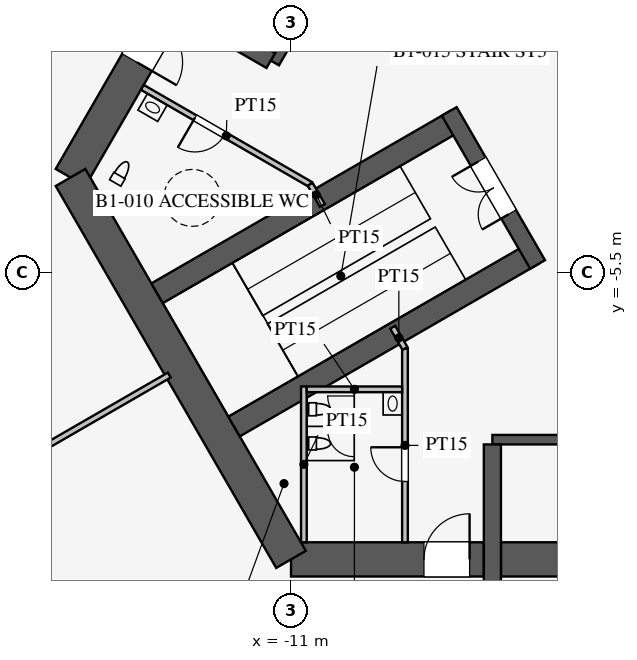
"""IFC4 building model, lengths in metres.
Left out: names, types, materials, properties, quantities, classifications, styles, units other than length and angle.
Written with IfcOpenShell. Run it as: python <this file> out.ifc"""

import sys

from ifc_helpers import new_model, si_unit, direction, frame, frame_2d, origin, place, context, subcontext, project, spatial, rectangle, extrude, element, fill, save


model = new_model("IFC4")
c1 = context("Model", 3, precision=1e-05, world=origin(), true_north=direction((0.0, 1.0)))
c2 = subcontext(c1, "Body", "Model", "MODEL_VIEW")
j1 = project(units=[si_unit("LENGTHUNIT", "METRE"), si_unit("PLANEANGLEUNIT", "RADIAN")], contexts=[c1])
p1 = place(None, origin())
s1 = spatial("IfcSite", under=j1, at=p1, CompositionType="ELEMENT")
p2 = place(p1, origin())
s2 = spatial("IfcBuilding", under=s1, at=p2, CompositionType="ELEMENT")
p3 = place(p2, frame((0.0, 0.0, -6.0)))
s3 = spatial("IfcBuildingStorey", under=s2, at=p3, CompositionType="ELEMENT", Elevation=-6.0)
p4 = place(p3, frame((-10.999, -13.05, -0.3), z_axis=(0.0, 0.0, 1.0), x_axis=(1.0, 0.0, 0.0)))
e1 = element("IfcWall", 1, at=p4, inside=s3, PredefinedType="SHEAR", context=c2, shape_type="SweptSolid", body=[
    extrude(rectangle(XDim=5.073, YDim=0.9, at=frame_2d((2.537, 0.0))), origin(), (0.0, 0.0, 1.0), 6.3),
])
p5 = place(p4, frame((3.499, 0.0, 0.3)))
e2 = element("IfcOpeningElement", 2, at=p5, cuts=e1, PredefinedType="OPENING", context=c2, shape_type="SweptSolid", body=[
    extrude(rectangle(XDim=1.2, YDim=2.1, at=frame_2d((0.6, 1.05))), frame((0.0, 0.46, 0.0), z_axis=(0.0, -1.0, 0.0), x_axis=(1.0, 0.0, 0.0)), (0.0, 0.0, 1.0), 0.92),
])
p6 = place(p3, frame((-5.475, -13.05, -0.3), z_axis=(0.0, 0.0, 1.0), x_axis=(1.0, 0.0, 0.0)))
e3 = element("IfcWall", 3, at=p6, inside=s3, PredefinedType="SHEAR", context=c2, shape_type="SweptSolid", body=[
    extrude(rectangle(XDim=2.4, YDim=0.9, at=frame_2d((1.2, 0.0))), origin(), (0.0, 0.0, 1.0), 6.3),
])
p7 = place(p3, frame((-5.802, 16.05, -0.3), z_axis=(0.0, 0.0, 1.0), x_axis=(-0.499991141822, -0.866030517996, 0.0)))
e4 = element("IfcWall", 4, at=p7, inside=s3, PredefinedType="SHEAR", context=c2, shape_type="SweptSolid", body=[
    extrude(rectangle(XDim=21.997, YDim=0.9, at=frame_2d((10.999, 0.0))), origin(), (0.0, 0.0, 1.0), 6.3),
])
p8 = place(p7, frame((17.299, 0.0, 0.3)))
e5 = element("IfcOpeningElement", 5, at=p8, cuts=e4, PredefinedType="OPENING", context=c2, shape_type="SweptSolid", body=[
    extrude(rectangle(XDim=1.2, YDim=2.1, at=frame_2d((0.6, 1.05))), frame((0.0, 0.46, 0.0), z_axis=(0.0, -1.0, 0.0), x_axis=(1.0, 0.0, 0.0)), (0.0, 0.0, 1.0), 0.92),
])
p9 = place(p7, frame((3.499, 0.0, 0.3)))
e6 = element("IfcOpeningElement", 6, at=p9, cuts=e4, PredefinedType="OPENING", context=c2, shape_type="SweptSolid", body=[
    extrude(rectangle(XDim=1.2, YDim=2.1, at=frame_2d((0.6, 1.05))), frame((0.0, 0.46, 0.0), z_axis=(0.0, -1.0, 0.0), x_axis=(1.0, 0.0, 0.0)), (0.0, 0.0, 1.0), 0.92),
])
p10 = place(p3, frame((-16.801, -3.0, -0.3), z_axis=(0.0, 0.0, 1.0), x_axis=(0.499990156827, -0.866031086669, 0.0)))
e7 = element("IfcWall", 7, at=p10, inside=s3, PredefinedType="SHEAR", context=c2, shape_type="SweptSolid", body=[
    extrude(rectangle(XDim=11.605, YDim=0.9, at=frame_2d((5.802, 0.0))), origin(), (0.0, 0.0, 1.0), 6.3),
])
p11 = place(p3, frame((-5.7, -9.9, -0.3), z_axis=(0.0, 0.0, 1.0), x_axis=(1.0, 0.0, 0.0)))
e8 = element("IfcWall", 8, at=p11, inside=s3, PredefinedType="SHEAR", context=c2, shape_type="SweptSolid", body=[
    extrude(rectangle(XDim=11.4, YDim=0.25, at=frame_2d((5.7, 0.0))), origin(), (0.0, 0.0, 1.0), 6.3),
])
p12 = place(p3, frame((-5.7, -10.025, -0.3), z_axis=(0.0, 0.0, 1.0), x_axis=(0.0, -1.0, 0.0)))
e9 = element("IfcWall", 9, at=p12, inside=s3, PredefinedType="SHEAR", context=c2, shape_type="SweptSolid", body=[
    extrude(rectangle(XDim=4.575, YDim=0.45, at=frame_2d((2.288, 0.0))), origin(), (0.0, 0.0, 1.0), 6.3),
])
p13 = place(p3, frame((-5.724, 9.886, -1.6), z_axis=(0.0, 0.0, 1.0), x_axis=(-0.500001763848, -0.866024385424, 0.0)))
e10 = element("IfcWall", 10, at=p13, inside=s3, PredefinedType="SHEAR", context=c2, shape_type="SweptSolid", body=[
    extrude(rectangle(XDim=11.4, YDim=0.25, at=frame_2d((5.7, 0.0))), origin(), (0.0, 0.0, 1.0), 7.6),
])
p14 = place(p13, frame((6.525, 0.0, 1.6)))
e11 = element("IfcOpeningElement", 11, at=p14, cuts=e10, PredefinedType="OPENING", context=c2, shape_type="SweptSolid", body=[
    extrude(rectangle(XDim=1.2, YDim=2.2, at=frame_2d((0.6, 1.1))), frame((0.0, 0.135, 0.0), z_axis=(0.0, -1.0, 0.0), x_axis=(1.0, 0.0, 0.0)), (0.0, 0.0, 1.0), 0.27),
])
p15 = place(p13, frame((9.375, 0.0, 1.6)))
e12 = element("IfcOpeningElement", 12, at=p15, cuts=e10, PredefinedType="OPENING", context=c2, shape_type="SweptSolid", body=[
    extrude(rectangle(XDim=1.2, YDim=2.2, at=frame_2d((0.6, 1.1))), frame((0.0, 0.135, 0.0), z_axis=(0.0, -1.0, 0.0), x_axis=(1.0, 0.0, 0.0)), (0.0, 0.0, 1.0), 0.27),
])
p16 = place(p3, frame((-11.532, 0.076, -1.6), z_axis=(0.0, 0.0, 1.0), x_axis=(-0.866005588531, 0.500034319456, 0.0)))
e13 = element("IfcWall", 13, at=p16, inside=s3, PredefinedType="SHEAR", context=c2, shape_type="SweptSolid", body=[
    extrude(rectangle(XDim=2.575, YDim=0.45, at=frame_2d((1.288, 0.0))), origin(), (0.0, 0.0, 1.0), 7.6),
])
for number, where, z_axis, x_axis in (
    (14, (-6.663, -1.509, -0.3), (0.0, 0.0, 1.0), (-0.866, -0.5, 0.0)),
    (15, (-4.638, -5.016, -0.3), (0.0, 0.0, 1.0), (-0.866, -0.5, 0.0)),
):
    element("IfcWall", number, at=place(p3, frame(where, z_axis=z_axis, x_axis=x_axis)), inside=s3, PredefinedType="SHEAR", context=c2, shape_type="SweptSolid", body=[
        extrude(rectangle(XDim=9.075, YDim=0.6, at=frame_2d((4.538, 0.0))), origin(), (0.0, 0.0, 1.0), 6.3),
    ])
p17 = place(p3, frame((-6.835, -1.261, -0.3), z_axis=(0.0, 0.0, 1.0), x_axis=(0.499984536904, -0.866034331223, 0.0)))
e16 = element("IfcWall", 16, at=p17, inside=s3, PredefinedType="SHEAR", context=c2, shape_type="SweptSolid", body=[
    extrude(rectangle(XDim=4.65, YDim=0.45, at=frame_2d((2.325, 0.0))), origin(), (0.0, 0.0, 1.0), 6.3),
])
p18 = place(p17, frame((1.525, 0.0, 0.3)))
e17 = element("IfcOpeningElement", 17, at=p18, cuts=e16, PredefinedType="OPENING", context=c2, shape_type="SweptSolid", body=[
    extrude(rectangle(XDim=1.6, YDim=2.1, at=frame_2d((0.8, 1.05))), frame((0.0, 0.235, 0.0), z_axis=(0.0, -1.0, 0.0), x_axis=(1.0, 0.0, 0.0)), (0.0, 0.0, 1.0), 0.47),
])
p19 = place(p3, frame((-8.0, -7.5, 0.0), z_axis=(0.0, 0.0, 1.0), x_axis=(0.0, -1.0, 0.0)))
e18 = element("IfcWall", 18, at=p19, inside=s3, PredefinedType="PARTITIONING", context=c2, shape_type="SweptSolid", body=[
    extrude(rectangle(XDim=5.1, YDim=0.15, at=frame_2d((2.55, 0.0))), origin(), (0.0, 0.0, 1.0), 5.7),
])
p20 = place(p19, frame((2.6, 0.0, 0.0)))
e19 = element("IfcOpeningElement", 19, at=p20, cuts=e18, PredefinedType="OPENING", context=c2, shape_type="SweptSolid", body=[
    extrude(rectangle(XDim=0.9, YDim=2.1, at=frame_2d((0.45, 1.05))), frame((0.0, 0.085, 0.0), z_axis=(0.0, -1.0, 0.0), x_axis=(1.0, 0.0, 0.0)), (0.0, 0.0, 1.0), 0.17),
])
p21 = place(p3, frame((-10.495, -3.178, 0.0), z_axis=(0.0, 0.0, 1.0), x_axis=(-0.86602216432, 0.500005610874, 0.0)))
e20 = element("IfcWall", 20, at=p21, inside=s3, PredefinedType="PARTITIONING", context=c2, shape_type="SweptSolid", body=[
    extrude(rectangle(XDim=5.1, YDim=0.15, at=frame_2d((2.55, 0.0))), origin(), (0.0, 0.0, 1.0), 5.7),
])
p22 = place(p21, frame((2.6, 0.0, 0.0)))
e21 = element("IfcOpeningElement", 21, at=p22, cuts=e20, PredefinedType="OPENING", context=c2, shape_type="SweptSolid", body=[
    extrude(rectangle(XDim=0.9, YDim=2.1, at=frame_2d((0.45, 1.05))), frame((0.0, 0.085, 0.0), z_axis=(0.0, -1.0, 0.0), x_axis=(1.0, 0.0, 0.0)), (0.0, 0.0, 1.0), 0.17),
])
for number, where, z_axis, x_axis in (
    (22, (-10.495, -3.178, 0.0), (0.0, 0.0, 1.0), (0.5, -0.866, 0.0)),
    (23, (-8.0, -7.5, 0.0), (0.0, 0.0, 1.0), (-0.5, 0.866, 0.0)),
):
    element("IfcWall", number, at=place(p3, frame(where, z_axis=z_axis, x_axis=x_axis)), inside=s3, PredefinedType="PARTITIONING", context=c2, shape_type="SweptSolid", body=[
        extrude(rectangle(XDim=0.645, YDim=0.15, at=frame_2d((0.323, 0.0))), origin(), (0.0, 0.0, 1.0), 5.7),
    ])
p23 = place(p3, frame((-10.66, -8.5, 0.0), z_axis=(0.0, 0.0, 1.0), x_axis=(0.0, -1.0, 0.0)))
e24 = element("IfcWall", 24, at=p23, inside=s3, PredefinedType="PARTITIONING", context=c2, shape_type="SweptSolid", body=[
    extrude(rectangle(XDim=4.1, YDim=0.15, at=frame_2d((2.05, 0.0))), origin(), (0.0, 0.0, 1.0), 5.7),
])
p24 = place(p3, frame((-8.075, -8.575, 0.0), z_axis=(0.0, 0.0, 1.0), x_axis=(-1.0, 0.0, 0.0)))
e25 = element("IfcWall", 25, at=p24, inside=s3, PredefinedType="PARTITIONING", context=c2, shape_type="SweptSolid", body=[
    extrude(rectangle(XDim=2.51, YDim=0.15, at=frame_2d((1.255, 0.0))), origin(), (0.0, 0.0, 1.0), 5.7),
])
p25 = place(p3, frame((-14.203, -8.2, 0.0), z_axis=(0.0, 0.0, 1.0), x_axis=(-0.866024965723, -0.500000758745, 0.0)))
e26 = element("IfcWall", 26, at=p25, inside=s3, PredefinedType="PARTITIONING", context=c2, shape_type="SweptSolid", body=[
    extrude(rectangle(XDim=18.25, YDim=0.15, at=frame_2d((9.125, 0.0))), origin(), (0.0, 0.0, 1.0), 3.7),
])
p26 = place(p20, frame((0.9, 0.0, 0.0), z_axis=(0.0, 0.0, 1.0), x_axis=(-1.0, 0.0, 0.0)))
e27 = element("IfcDoor", 27, at=p26, inside=s3, OperationType="SINGLE_SWING_RIGHT", PredefinedType="DOOR", context=c2, shape_type="SweptSolid", body=[
    extrude(rectangle(XDim=0.9, YDim=2.1, at=frame_2d((0.45, 1.05))), frame((0.0, 0.025, 0.0), z_axis=(0.0, -1.0, 0.0), x_axis=(1.0, 0.0, 0.0)), (0.0, 0.0, 1.0), 0.05),
])
fill(e19, e27)
p27 = place(p22, origin())
e28 = element("IfcDoor", 28, at=p27, inside=s3, OperationType="SINGLE_SWING_RIGHT", PredefinedType="DOOR", context=c2, shape_type="SweptSolid", body=[
    extrude(rectangle(XDim=0.9, YDim=2.1, at=frame_2d((0.45, 1.05))), frame((0.0, 0.025, 0.0), z_axis=(0.0, -1.0, 0.0), x_axis=(1.0, 0.0, 0.0)), (0.0, 0.0, 1.0), 0.05),
])
fill(e21, e28)
p28 = place(p18, frame((1.6, 0.0, 0.0), z_axis=(0.0, 0.0, 1.0), x_axis=(-1.0, 0.0, 0.0)))
e29 = element("IfcDoor", 29, at=p28, inside=s3, OperationType="DOUBLE_DOOR_SINGLE_SWING", PredefinedType="DOOR", context=c2, shape_type="SweptSolid", body=[
    extrude(rectangle(XDim=1.6, YDim=2.1, at=frame_2d((0.8, 1.05))), frame((0.0, 0.025, 0.0), z_axis=(0.0, -1.0, 0.0), x_axis=(1.0, 0.0, 0.0)), (0.0, 0.0, 1.0), 0.05),
])
fill(e17, e29)
p29 = place(p5, origin())
e30 = element("IfcDoor", 30, at=p29, inside=s3, OperationType="SINGLE_SWING_RIGHT", PredefinedType="DOOR", context=c2, shape_type="SweptSolid", body=[
    extrude(rectangle(XDim=1.2, YDim=2.1, at=frame_2d((0.6, 1.05))), frame((0.0, 0.025, 0.0), z_axis=(0.0, -1.0, 0.0), x_axis=(1.0, 0.0, 0.0)), (0.0, 0.0, 1.0), 0.05),
])
fill(e2, e30)
p30 = place(p8, origin())
e31 = element("IfcDoor", 31, at=p30, inside=s3, OperationType="SINGLE_SWING_RIGHT", PredefinedType="DOOR", context=c2, shape_type="SweptSolid", body=[
    extrude(rectangle(XDim=1.2, YDim=2.1, at=frame_2d((0.6, 1.05))), frame((0.0, 0.025, 0.0), z_axis=(0.0, -1.0, 0.0), x_axis=(1.0, 0.0, 0.0)), (0.0, 0.0, 1.0), 0.05),
])
fill(e5, e31)
save(model, sys.argv[1])
